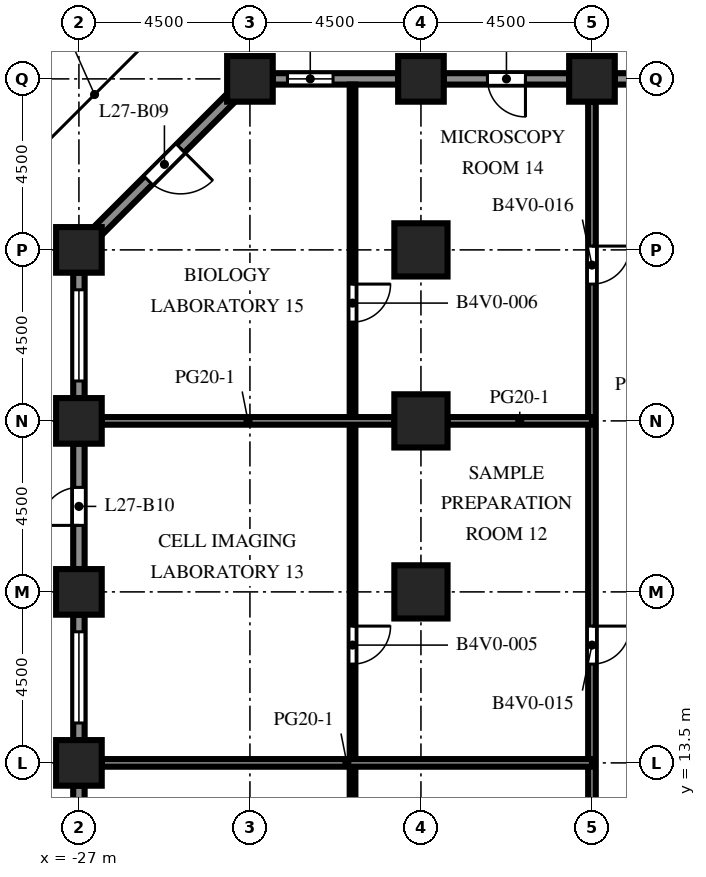
"""IFC4 building model, lengths in metres.
Left out: names, types, materials, properties, quantities, classifications, styles, units other than length and angle.
Written with IfcOpenShell. Run it as: python <this file> out.ifc"""

import sys

from ifc_helpers import new_model, si_unit, direction, frame, frame_2d, origin, origin_2d, place, context, subcontext, project, spatial, rectangle, extrude, element, fill, save


model = new_model("IFC4")
c1 = context("Model", 3, precision=1e-05, world=origin(), true_north=direction((0.0, 1.0)))
c2 = subcontext(c1, "Body", "Model", "MODEL_VIEW")
j1 = project(units=[si_unit("LENGTHUNIT", "METRE"), si_unit("PLANEANGLEUNIT", "RADIAN")], contexts=[c1])
p1 = place(None, origin())
s1 = spatial("IfcSite", under=j1, at=p1, CompositionType="ELEMENT")
p2 = place(p1, origin())
s2 = spatial("IfcBuilding", under=s1, at=p2, CompositionType="ELEMENT")
p3 = place(p2, frame((0.0, 0.0, 120.8)))
s3 = spatial("IfcBuildingStorey", under=s2, at=p3, CompositionType="ELEMENT", Elevation=120.8)
for number, where, z_axis, x_axis in (
    (1, (-27.0, 13.5, 0.0), (0.0, 0.0, 1.0), (1.0, 0.0, 0.0)),
    (2, (-27.0, 18.0, 0.0), (0.0, 0.0, 1.0), (1.0, 0.0, 0.0)),
    (3, (-27.0, 22.5, 0.0), (0.0, 0.0, 1.0), (1.0, 0.0, 0.0)),
    (4, (-27.0, 27.0, 0.0), (0.0, 0.0, 1.0), (1.0, 0.0, 0.0)),
    (5, (-22.5, 31.5, 0.0), (0.0, 0.0, 1.0), (1.0, 0.0, 0.0)),
    (6, (-18.0, 31.5, 0.0), (0.0, 0.0, 1.0), (1.0, 0.0, 0.0)),
    (7, (-13.5, 31.5, 0.0), (0.0, 0.0, 1.0), (1.0, 0.0, 0.0)),
):
    element("IfcColumn", number, at=place(p3, frame(where, z_axis=z_axis, x_axis=x_axis)), inside=s3, PredefinedType="COLUMN", context=c2, shape_type="SweptSolid", body=[
        extrude(rectangle(XDim=1.2, YDim=1.2, at=origin_2d()), origin(), (0.0, 0.0, 1.0), 4.1),
    ])
for number, where, z_axis, x_axis in (
    (8, (-18.0, 18.0, 0.0), (0.0, 0.0, 1.0), (1.0, 0.0, 0.0)),
    (9, (-18.0, 22.5, 0.0), (0.0, 0.0, 1.0), (1.0, 0.0, 0.0)),
    (10, (-18.0, 27.0, 0.0), (0.0, 0.0, 1.0), (1.0, 0.0, 0.0)),
):
    element("IfcColumn", number, at=place(p3, frame(where, z_axis=z_axis, x_axis=x_axis)), inside=s3, PredefinedType="COLUMN", context=c2, shape_type="SweptSolid", body=[
        extrude(rectangle(XDim=1.4, YDim=1.4, at=origin_2d()), origin(), (0.0, 0.0, 1.0), 4.1),
    ])
p4 = place(p3, frame((-12.9, 31.5, 0.0), z_axis=(0.0, 0.0, 1.0), x_axis=(1.0, 0.0, 0.0)))
e11 = element("IfcWall", 11, at=p4, inside=s3, PredefinedType="SOLIDWALL", context=c2, shape_type="SweptSolid", body=[
    extrude(rectangle(XDim=3.3, YDim=0.3, at=frame_2d((1.65, 0.0))), origin(), (0.0, 0.0, 1.0), 2.75),
])
p5 = place(p4, frame((0.525, 0.0, 0.8)))
e12 = element("IfcOpeningElement", 12, at=p5, cuts=e11, PredefinedType="OPENING", context=c2, shape_type="SweptSolid", body=[
    extrude(rectangle(XDim=1.2, YDim=1.7, at=frame_2d((0.6, 0.85))), frame((0.0, 0.16, 0.0), z_axis=(0.0, -1.0, 0.0), x_axis=(1.0, 0.0, 0.0)), (0.0, 0.0, 1.0), 0.32),
])
p6 = place(p3, frame((-17.4, 31.5, 0.0), z_axis=(0.0, 0.0, 1.0), x_axis=(1.0, 0.0, 0.0)))
e13 = element("IfcWall", 13, at=p6, inside=s3, PredefinedType="SOLIDWALL", context=c2, shape_type="SweptSolid", body=[
    extrude(rectangle(XDim=3.3, YDim=0.3, at=frame_2d((1.65, 0.0))), origin(), (0.0, 0.0, 1.0), 2.75),
])
p7 = place(p6, frame((1.15, 0.0, 0.0)))
e14 = element("IfcOpeningElement", 14, at=p7, cuts=e13, PredefinedType="OPENING", context=c2, shape_type="SweptSolid", body=[
    extrude(rectangle(XDim=1.0, YDim=2.2, at=frame_2d((0.5, 1.1))), frame((0.0, 0.16, 0.0), z_axis=(0.0, -1.0, 0.0), x_axis=(1.0, 0.0, 0.0)), (0.0, 0.0, 1.0), 0.32),
])
p8 = place(p3, frame((-21.9, 31.5, 0.0), z_axis=(0.0, 0.0, 1.0), x_axis=(1.0, 0.0, 0.0)))
e15 = element("IfcWall", 15, at=p8, inside=s3, PredefinedType="SOLIDWALL", context=c2, shape_type="SweptSolid", body=[
    extrude(rectangle(XDim=3.3, YDim=0.3, at=frame_2d((1.65, 0.0))), origin(), (0.0, 0.0, 1.0), 2.75),
])
p9 = place(p8, frame((0.387, 0.0, 0.8)))
e16 = element("IfcOpeningElement", 16, at=p9, cuts=e15, PredefinedType="OPENING", context=c2, shape_type="SweptSolid", body=[
    extrude(rectangle(XDim=1.2, YDim=1.7, at=frame_2d((0.6, 0.85))), frame((0.0, 0.16, 0.0), z_axis=(0.0, -1.0, 0.0), x_axis=(1.0, 0.0, 0.0)), (0.0, 0.0, 1.0), 0.32),
])
p10 = place(p3, frame((-26.506, 27.494, 0.0), z_axis=(0.0, 0.0, 1.0), x_axis=(0.707106781187, 0.707106781187, 0.0)))
e17 = element("IfcWall", 17, at=p10, inside=s3, PredefinedType="SOLIDWALL", context=c2, shape_type="SweptSolid", body=[
    extrude(rectangle(XDim=4.967, YDim=0.3, at=frame_2d((2.483, 0.0))), origin(), (0.0, 0.0, 1.0), 2.75),
])
p11 = place(p10, frame((1.884, 0.0, 0.0)))
e18 = element("IfcOpeningElement", 18, at=p11, cuts=e17, PredefinedType="OPENING", context=c2, shape_type="SweptSolid", body=[
    extrude(rectangle(XDim=1.2, YDim=2.2, at=frame_2d((0.6, 1.1))), frame((0.0, 0.16, 0.0), z_axis=(0.0, -1.0, 0.0), x_axis=(1.0, 0.0, 0.0)), (0.0, 0.0, 1.0), 0.32),
])
p12 = place(p3, frame((-27.0, 23.1, 0.0), z_axis=(0.0, 0.0, 1.0), x_axis=(0.0, 1.0, 0.0)))
e19 = element("IfcWall", 19, at=p12, inside=s3, PredefinedType="SOLIDWALL", context=c2, shape_type="SweptSolid", body=[
    extrude(rectangle(XDim=3.3, YDim=0.3, at=frame_2d((1.65, 0.0))), origin(), (0.0, 0.0, 1.0), 2.75),
])
p13 = place(p12, frame((0.45, 0.0, 0.8)))
e20 = element("IfcOpeningElement", 20, at=p13, cuts=e19, PredefinedType="OPENING", context=c2, shape_type="SweptSolid", body=[
    extrude(rectangle(XDim=2.4, YDim=1.7, at=frame_2d((1.2, 0.85))), frame((0.0, 0.16, 0.0), z_axis=(0.0, -1.0, 0.0), x_axis=(1.0, 0.0, 0.0)), (0.0, 0.0, 1.0), 0.32),
])
p14 = place(p3, frame((-27.0, 18.6, 0.0), z_axis=(0.0, 0.0, 1.0), x_axis=(0.0, 1.0, 0.0)))
e21 = element("IfcWall", 21, at=p14, inside=s3, PredefinedType="SOLIDWALL", context=c2, shape_type="SweptSolid", body=[
    extrude(rectangle(XDim=3.3, YDim=0.3, at=frame_2d((1.65, 0.0))), origin(), (0.0, 0.0, 1.0), 2.75),
])
p15 = place(p14, frame((1.15, 0.0, 0.0)))
e22 = element("IfcOpeningElement", 22, at=p15, cuts=e21, PredefinedType="OPENING", context=c2, shape_type="SweptSolid", body=[
    extrude(rectangle(XDim=1.0, YDim=2.2, at=frame_2d((0.5, 1.1))), frame((0.0, 0.16, 0.0), z_axis=(0.0, -1.0, 0.0), x_axis=(1.0, 0.0, 0.0)), (0.0, 0.0, 1.0), 0.32),
])
p16 = place(p3, frame((-27.0, 14.1, 0.0), z_axis=(0.0, 0.0, 1.0), x_axis=(0.0, 1.0, 0.0)))
e23 = element("IfcWall", 23, at=p16, inside=s3, PredefinedType="SOLIDWALL", context=c2, shape_type="SweptSolid", body=[
    extrude(rectangle(XDim=3.3, YDim=0.3, at=frame_2d((1.65, 0.0))), origin(), (0.0, 0.0, 1.0), 2.75),
])
p17 = place(p16, frame((0.45, 0.0, 0.8)))
e24 = element("IfcOpeningElement", 24, at=p17, cuts=e23, PredefinedType="OPENING", context=c2, shape_type="SweptSolid", body=[
    extrude(rectangle(XDim=2.4, YDim=1.7, at=frame_2d((1.2, 0.85))), frame((0.0, 0.16, 0.0), z_axis=(0.0, -1.0, 0.0), x_axis=(1.0, 0.0, 0.0)), (0.0, 0.0, 1.0), 0.32),
])
p18 = place(p3, frame((-27.0, 9.6, 0.0), z_axis=(0.0, 0.0, 1.0), x_axis=(0.0, 1.0, 0.0)))
e25 = element("IfcWall", 25, at=p18, inside=s3, PredefinedType="SOLIDWALL", context=c2, shape_type="SweptSolid", body=[
    extrude(rectangle(XDim=3.3, YDim=0.3, at=frame_2d((1.65, 0.0))), origin(), (0.0, 0.0, 1.0), 2.75),
])
p19 = place(p18, frame((0.45, 0.0, 0.8)))
e26 = element("IfcOpeningElement", 26, at=p19, cuts=e25, PredefinedType="OPENING", context=c2, shape_type="SweptSolid", body=[
    extrude(rectangle(XDim=2.4, YDim=1.7, at=frame_2d((1.2, 0.85))), frame((0.0, 0.16, 0.0), z_axis=(0.0, -1.0, 0.0), x_axis=(1.0, 0.0, 0.0)), (0.0, 0.0, 1.0), 0.32),
])
p20 = place(p3, frame((-19.8, -22.35, 0.0), z_axis=(0.0, 0.0, 1.0), x_axis=(0.0, 1.0, 0.0)))
e27 = element("IfcWall", 27, at=p20, inside=s3, PredefinedType="PARTITIONING", context=c2, shape_type="SweptSolid", body=[
    extrude(rectangle(XDim=53.7, YDim=0.15, at=frame_2d((26.85, 0.0))), origin(), (0.0, 0.0, 1.0), 3.65),
])
p21 = place(p20, frame((5.2, 0.0, 0.0)))
e28 = element("IfcOpeningElement", 28, at=p21, cuts=e27, PredefinedType="OPENING", context=c2, shape_type="SweptSolid", body=[
    extrude(rectangle(XDim=1.0, YDim=2.1, at=frame_2d((0.5, 1.05))), frame((0.0, 0.085, 0.0), z_axis=(0.0, -1.0, 0.0), x_axis=(1.0, 0.0, 0.0)), (0.0, 0.0, 1.0), 0.17),
])
p22 = place(p20, frame((14.2, 0.0, 0.0)))
e29 = element("IfcOpeningElement", 29, at=p22, cuts=e27, PredefinedType="OPENING", context=c2, shape_type="SweptSolid", body=[
    extrude(rectangle(XDim=1.0, YDim=2.1, at=frame_2d((0.5, 1.05))), frame((0.0, 0.085, 0.0), z_axis=(0.0, -1.0, 0.0), x_axis=(1.0, 0.0, 0.0)), (0.0, 0.0, 1.0), 0.17),
])
p23 = place(p20, frame((19.2, 0.0, 0.0)))
e30 = element("IfcOpeningElement", 30, at=p23, cuts=e27, PredefinedType="OPENING", context=c2, shape_type="SweptSolid", body=[
    extrude(rectangle(XDim=1.0, YDim=2.1, at=frame_2d((0.5, 1.05))), frame((0.0, 0.085, 0.0), z_axis=(0.0, -1.0, 0.0), x_axis=(1.0, 0.0, 0.0)), (0.0, 0.0, 1.0), 0.17),
])
p24 = place(p20, frame((29.2, 0.0, 0.0)))
e31 = element("IfcOpeningElement", 31, at=p24, cuts=e27, PredefinedType="OPENING", context=c2, shape_type="SweptSolid", body=[
    extrude(rectangle(XDim=1.0, YDim=2.1, at=frame_2d((0.5, 1.05))), frame((0.0, 0.085, 0.0), z_axis=(0.0, -1.0, 0.0), x_axis=(1.0, 0.0, 0.0)), (0.0, 0.0, 1.0), 0.17),
])
p25 = place(p20, frame((38.45, 0.0, 0.0)))
e32 = element("IfcOpeningElement", 32, at=p25, cuts=e27, PredefinedType="OPENING", context=c2, shape_type="SweptSolid", body=[
    extrude(rectangle(XDim=1.0, YDim=2.1, at=frame_2d((0.5, 1.05))), frame((0.0, 0.085, 0.0), z_axis=(0.0, -1.0, 0.0), x_axis=(1.0, 0.0, 0.0)), (0.0, 0.0, 1.0), 0.17),
])
p26 = place(p20, frame((47.45, 0.0, 0.0)))
e33 = element("IfcOpeningElement", 33, at=p26, cuts=e27, PredefinedType="OPENING", context=c2, shape_type="SweptSolid", body=[
    extrude(rectangle(XDim=1.0, YDim=2.1, at=frame_2d((0.5, 1.05))), frame((0.0, 0.085, 0.0), z_axis=(0.0, -1.0, 0.0), x_axis=(1.0, 0.0, 0.0)), (0.0, 0.0, 1.0), 0.17),
])
p27 = place(p3, frame((-13.5, -21.9, 0.0), z_axis=(0.0, 0.0, 1.0), x_axis=(0.0, 1.0, 0.0)))
e34 = element("IfcWall", 34, at=p27, inside=s3, PredefinedType="PARTITIONING", context=c2, shape_type="SweptSolid", body=[
    extrude(rectangle(XDim=52.8, YDim=0.2, at=frame_2d((26.4, 0.0))), origin(), (0.0, 0.0, 1.0), 3.65),
])
p28 = place(p27, frame((4.5, 0.0, 0.0)))
e35 = element("IfcOpeningElement", 35, at=p28, cuts=e34, PredefinedType="OPENING", context=c2, shape_type="SweptSolid", body=[
    extrude(rectangle(XDim=1.0, YDim=2.1, at=frame_2d((0.5, 1.05))), frame((0.0, 0.11, 0.0), z_axis=(0.0, -1.0, 0.0), x_axis=(1.0, 0.0, 0.0)), (0.0, 0.0, 1.0), 0.22),
])
p29 = place(p27, frame((12.0, 0.0, 0.0)))
e36 = element("IfcOpeningElement", 36, at=p29, cuts=e34, PredefinedType="OPENING", context=c2, shape_type="SweptSolid", body=[
    extrude(rectangle(XDim=1.0, YDim=2.1, at=frame_2d((0.5, 1.05))), frame((0.0, 0.11, 0.0), z_axis=(0.0, -1.0, 0.0), x_axis=(1.0, 0.0, 0.0)), (0.0, 0.0, 1.0), 0.22),
])
p30 = place(p27, frame((18.75, 0.0, 0.0)))
e37 = element("IfcOpeningElement", 37, at=p30, cuts=e34, PredefinedType="OPENING", context=c2, shape_type="SweptSolid", body=[
    extrude(rectangle(XDim=1.0, YDim=2.1, at=frame_2d((0.5, 1.05))), frame((0.0, 0.11, 0.0), z_axis=(0.0, -1.0, 0.0), x_axis=(1.0, 0.0, 0.0)), (0.0, 0.0, 1.0), 0.22),
])
p31 = place(p27, frame((29.75, 0.0, 0.0)))
e38 = element("IfcOpeningElement", 38, at=p31, cuts=e34, PredefinedType="OPENING", context=c2, shape_type="SweptSolid", body=[
    extrude(rectangle(XDim=1.0, YDim=2.1, at=frame_2d((0.5, 1.05))), frame((0.0, 0.11, 0.0), z_axis=(0.0, -1.0, 0.0), x_axis=(1.0, 0.0, 0.0)), (0.0, 0.0, 1.0), 0.22),
])
p32 = place(p27, frame((38.0, 0.0, 0.0)))
e39 = element("IfcOpeningElement", 39, at=p32, cuts=e34, PredefinedType="OPENING", context=c2, shape_type="SweptSolid", body=[
    extrude(rectangle(XDim=1.0, YDim=2.1, at=frame_2d((0.5, 1.05))), frame((0.0, 0.11, 0.0), z_axis=(0.0, -1.0, 0.0), x_axis=(1.0, 0.0, 0.0)), (0.0, 0.0, 1.0), 0.22),
])
p33 = place(p27, frame((48.0, 0.0, 0.0)))
e40 = element("IfcOpeningElement", 40, at=p33, cuts=e34, PredefinedType="OPENING", context=c2, shape_type="SweptSolid", body=[
    extrude(rectangle(XDim=1.0, YDim=2.1, at=frame_2d((0.5, 1.05))), frame((0.0, 0.11, 0.0), z_axis=(0.0, -1.0, 0.0), x_axis=(1.0, 0.0, 0.0)), (0.0, 0.0, 1.0), 0.22),
])
p34 = place(p3, frame((-26.4, 13.5, 0.0), z_axis=(0.0, 0.0, 1.0), x_axis=(1.0, 0.0, 0.0)))
e41 = element("IfcWall", 41, at=p34, inside=s3, PredefinedType="PARTITIONING", context=c2, shape_type="SweptSolid", body=[
    extrude(rectangle(XDim=12.9, YDim=0.2, at=frame_2d((6.45, 0.0))), origin(), (0.0, 0.0, 1.0), 3.65),
])
p35 = place(p3, frame((-26.4, 22.5, 0.0), z_axis=(0.0, 0.0, 1.0), x_axis=(1.0, 0.0, 0.0)))
e42 = element("IfcWall", 42, at=p35, inside=s3, PredefinedType="PARTITIONING", context=c2, shape_type="SweptSolid", body=[
    extrude(rectangle(XDim=7.7, YDim=0.2, at=frame_2d((3.85, 0.0))), origin(), (0.0, 0.0, 1.0), 3.65),
])
p36 = place(p3, frame((-17.3, 22.5, 0.0), z_axis=(0.0, 0.0, 1.0), x_axis=(1.0, 0.0, 0.0)))
e43 = element("IfcWall", 43, at=p36, inside=s3, PredefinedType="PARTITIONING", context=c2, shape_type="SweptSolid", body=[
    extrude(rectangle(XDim=3.8, YDim=0.2, at=frame_2d((1.9, 0.0))), origin(), (0.0, 0.0, 1.0), 3.65),
])
p37 = place(p7, origin())
e44 = element("IfcDoor", 44, at=p37, inside=s3, OperationType="SINGLE_SWING_RIGHT", PredefinedType="DOOR", context=c2, shape_type="SweptSolid", body=[
    extrude(rectangle(XDim=1.0, YDim=2.2, at=frame_2d((0.5, 1.1))), frame((0.0, 0.025, 0.0), z_axis=(0.0, -1.0, 0.0), x_axis=(1.0, 0.0, 0.0)), (0.0, 0.0, 1.0), 0.05),
])
fill(e14, e44)
p38 = place(p9, origin())
e45 = element("IfcWindow", 45, at=p38, inside=s3, PartitioningType="SINGLE_PANEL", PredefinedType="WINDOW", context=c2, shape_type="SweptSolid", body=[
    extrude(rectangle(XDim=1.2, YDim=1.7, at=frame_2d((0.6, 0.85))), frame((0.0, 0.03, 0.0), z_axis=(0.0, -1.0, 0.0), x_axis=(1.0, 0.0, 0.0)), (0.0, 0.0, 1.0), 0.06),
])
fill(e16, e45)
p39 = place(p11, origin())
e46 = element("IfcDoor", 46, at=p39, inside=s3, OperationType="SINGLE_SWING_RIGHT", PredefinedType="DOOR", context=c2, shape_type="SweptSolid", body=[
    extrude(rectangle(XDim=1.2, YDim=2.2, at=frame_2d((0.6, 1.1))), frame((0.0, 0.025, 0.0), z_axis=(0.0, -1.0, 0.0), x_axis=(1.0, 0.0, 0.0)), (0.0, 0.0, 1.0), 0.05),
])
fill(e18, e46)
p40 = place(p13, origin())
e47 = element("IfcWindow", 47, at=p40, inside=s3, PartitioningType="SINGLE_PANEL", PredefinedType="WINDOW", context=c2, shape_type="SweptSolid", body=[
    extrude(rectangle(XDim=2.4, YDim=1.7, at=frame_2d((1.2, 0.85))), frame((0.0, 0.03, 0.0), z_axis=(0.0, -1.0, 0.0), x_axis=(1.0, 0.0, 0.0)), (0.0, 0.0, 1.0), 0.06),
])
fill(e20, e47)
p41 = place(p15, origin())
e48 = element("IfcDoor", 48, at=p41, inside=s3, OperationType="SINGLE_SWING_LEFT", PredefinedType="DOOR", context=c2, shape_type="SweptSolid", body=[
    extrude(rectangle(XDim=1.0, YDim=2.2, at=frame_2d((0.5, 1.1))), frame((0.0, 0.025, 0.0), z_axis=(0.0, -1.0, 0.0), x_axis=(1.0, 0.0, 0.0)), (0.0, 0.0, 1.0), 0.05),
])
fill(e22, e48)
p42 = place(p17, origin())
e49 = element("IfcWindow", 49, at=p42, inside=s3, PartitioningType="SINGLE_PANEL", PredefinedType="WINDOW", context=c2, shape_type="SweptSolid", body=[
    extrude(rectangle(XDim=2.4, YDim=1.7, at=frame_2d((1.2, 0.85))), frame((0.0, 0.03, 0.0), z_axis=(0.0, -1.0, 0.0), x_axis=(1.0, 0.0, 0.0)), (0.0, 0.0, 1.0), 0.06),
])
fill(e24, e49)
p43 = place(p25, origin())
e50 = element("IfcDoor", 50, at=p43, inside=s3, OperationType="SINGLE_SWING_RIGHT", PredefinedType="DOOR", context=c2, shape_type="SweptSolid", body=[
    extrude(rectangle(XDim=1.0, YDim=2.1, at=frame_2d((0.5, 1.05))), frame((0.0, 0.025, 0.0), z_axis=(0.0, -1.0, 0.0), x_axis=(1.0, 0.0, 0.0)), (0.0, 0.0, 1.0), 0.05),
])
fill(e32, e50)
p44 = place(p26, origin())
e51 = element("IfcDoor", 51, at=p44, inside=s3, OperationType="SINGLE_SWING_RIGHT", PredefinedType="DOOR", context=c2, shape_type="SweptSolid", body=[
    extrude(rectangle(XDim=1.0, YDim=2.1, at=frame_2d((0.5, 1.05))), frame((0.0, 0.025, 0.0), z_axis=(0.0, -1.0, 0.0), x_axis=(1.0, 0.0, 0.0)), (0.0, 0.0, 1.0), 0.05),
])
fill(e33, e51)
p45 = place(p32, origin())
e52 = element("IfcDoor", 52, at=p45, inside=s3, OperationType="SINGLE_SWING_RIGHT", PredefinedType="DOOR", context=c2, shape_type="SweptSolid", body=[
    extrude(rectangle(XDim=1.0, YDim=2.1, at=frame_2d((0.5, 1.05))), frame((0.0, 0.025, 0.0), z_axis=(0.0, -1.0, 0.0), x_axis=(1.0, 0.0, 0.0)), (0.0, 0.0, 1.0), 0.05),
])
fill(e39, e52)
p46 = place(p33, origin())
e53 = element("IfcDoor", 53, at=p46, inside=s3, OperationType="SINGLE_SWING_RIGHT", PredefinedType="DOOR", context=c2, shape_type="SweptSolid", body=[
    extrude(rectangle(XDim=1.0, YDim=2.1, at=frame_2d((0.5, 1.05))), frame((0.0, 0.025, 0.0), z_axis=(0.0, -1.0, 0.0), x_axis=(1.0, 0.0, 0.0)), (0.0, 0.0, 1.0), 0.05),
])
fill(e40, e53)
save(model, sys.argv[1])
